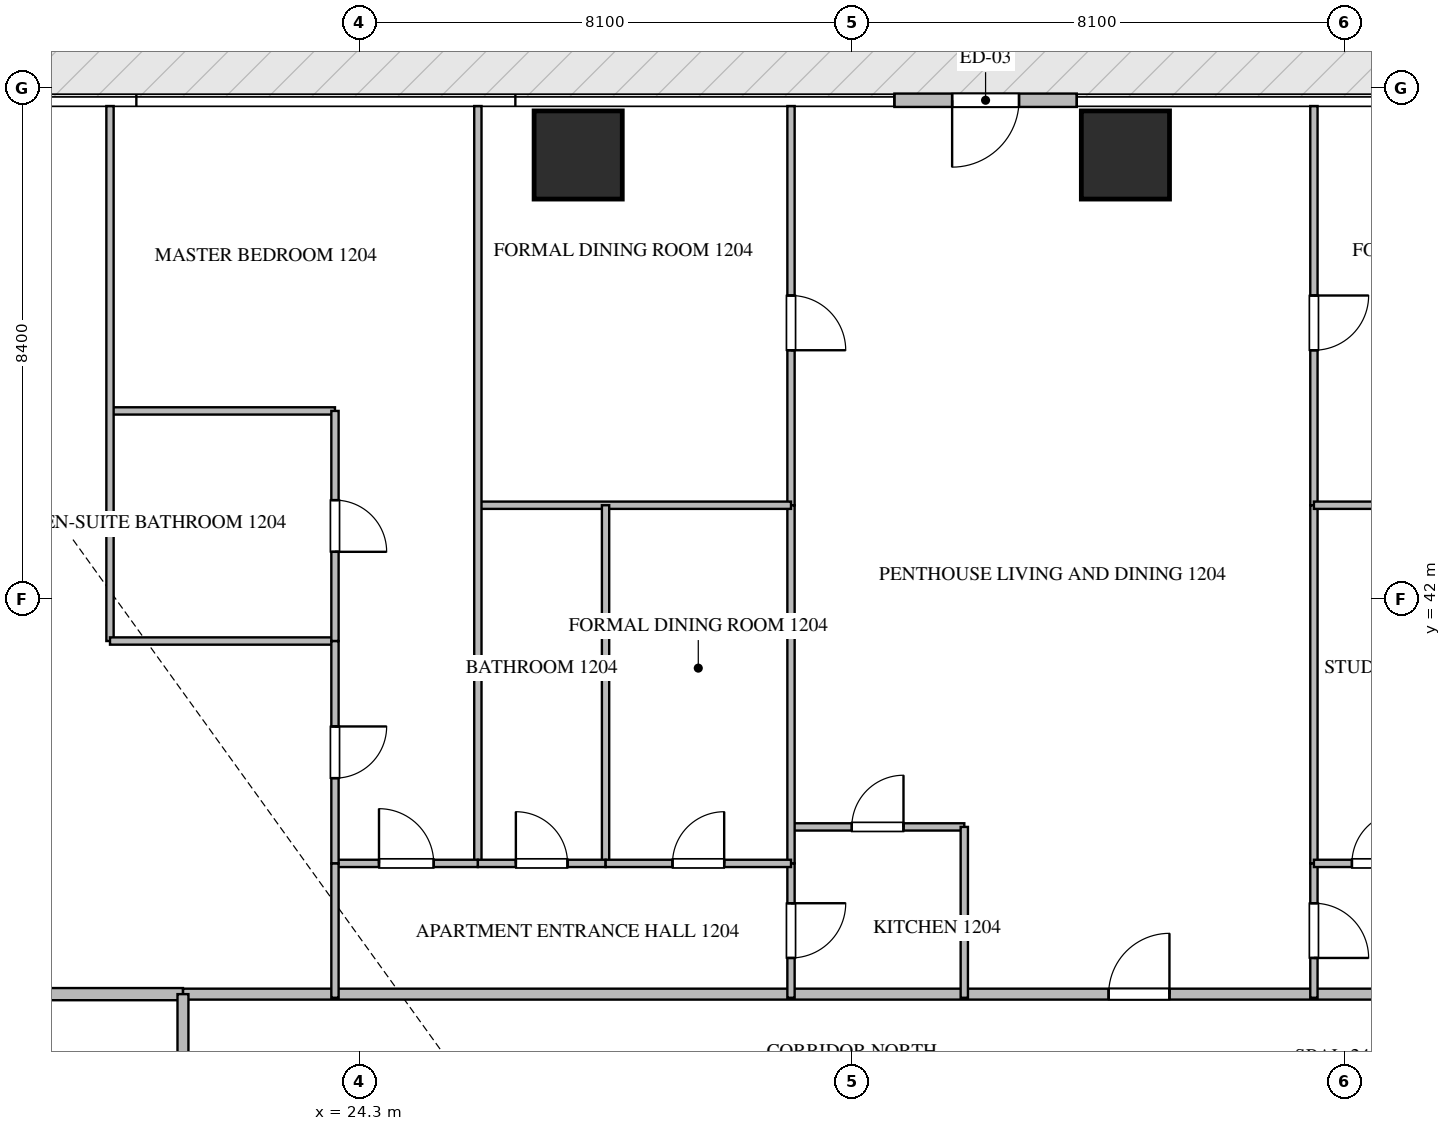
"""IFC4 building model, lengths in metres.
Left out: names, types, materials, properties, quantities, classifications, styles, units other than length and angle.
Written with IfcOpenShell. Run it as: python <this file> out.ifc"""

import sys

from ifc_helpers import new_model, si_unit, direction, frame, frame_2d, origin, origin_2d, place, context, subcontext, project, spatial, rectangle, extrude, source, transform, mapped, element, fill, save


model = new_model("IFC4")
c1 = context("Model", 3, precision=1e-05, world=origin(), true_north=direction((0.0, 1.0)))
c2 = subcontext(c1, "Body", "Model", "MODEL_VIEW")
j1 = project(units=[si_unit("LENGTHUNIT", "METRE"), si_unit("PLANEANGLEUNIT", "RADIAN")], contexts=[c1])
p1 = place(None, origin())
s1 = spatial("IfcSite", under=j1, at=p1, CompositionType="ELEMENT")
p2 = place(p1, origin())
s2 = spatial("IfcBuilding", under=s1, at=p2, CompositionType="ELEMENT")
p3 = place(p2, frame((0.0, 0.0, 52.95)))
s3 = spatial("IfcBuildingStorey", under=s2, at=p3, CompositionType="ELEMENT", Elevation=52.95)
m1 = source(origin(), c2, "Body", "SweptSolid", [
    extrude(rectangle(XDim=1.45, YDim=1.45, at=origin_2d()), origin(), (0.0, 0.0, 1.0), 3.75),
])
for number, where, z_axis, x_axis in (
    (1, (27.9, 49.3, -0.26), (0.0, 0.0, 1.0), (1.0, 0.0, 0.0)),
    (2, (36.9, 49.3, -0.26), (0.0, 0.0, 1.0), (1.0, 0.0, 0.0)),
):
    element("IfcColumn", number, at=place(p3, frame(where, z_axis=z_axis, x_axis=x_axis)), inside=s3, PredefinedType="COLUMN", context=c2, shape_type="MappedRepresentation", body=[
        mapped(m1, transform((0.0, 0.0, 0.0), scale=1.0)),
    ])
p4 = place(p3, frame((36.1, 50.2, 0.0), z_axis=(0.0, 0.0, 1.0), x_axis=(-1.0, 0.0, 0.0)))
e3 = element("IfcWall", 3, at=p4, inside=s3, PredefinedType="ELEMENTEDWALL", context=c2, shape_type="SweptSolid", body=[
    extrude(rectangle(XDim=3.0, YDim=0.22, at=frame_2d((1.5, 0.0))), origin(), (0.0, 0.0, 1.0), 3.475),
])
p5 = place(p4, frame((0.95, 0.0, 0.0)))
e4 = element("IfcOpeningElement", 4, at=p5, cuts=e3, PredefinedType="OPENING", context=c2, shape_type="SweptSolid", body=[
    extrude(rectangle(XDim=1.1, YDim=2.2, at=frame_2d((0.55, 1.1))), frame((0.0, 0.12, 0.0), z_axis=(0.0, -1.0, 0.0), x_axis=(1.0, 0.0, 0.0)), (0.0, 0.0, 1.0), 0.24),
])
p6 = place(p3, frame((6.082, 35.5, 0.0), z_axis=(0.0, 0.0, 1.0), x_axis=(1.0, 0.0, 0.0)))
e5 = element("IfcWall", 5, at=p6, inside=s3, PredefinedType="PARTITIONING", context=c2, shape_type="SweptSolid", body=[
    extrude(rectangle(XDim=15.318, YDim=0.2, at=frame_2d((7.659, 0.0))), origin(), (0.0, 0.0, 1.0), 3.49),
])
p7 = place(p3, frame((21.402, 35.5, 0.0), z_axis=(0.0, 0.0, 1.0), x_axis=(1.0, 0.0, 0.0)))
e6 = element("IfcWall", 6, at=p7, inside=s3, PredefinedType="PARTITIONING", context=c2, shape_type="SweptSolid", body=[
    extrude(rectangle(XDim=21.996, YDim=0.18, at=frame_2d((10.998, 0.0))), origin(), (0.0, 0.0, 1.0), 3.49),
])
p8 = place(p7, frame((15.222, 0.0, 0.0)))
e7 = element("IfcOpeningElement", 7, at=p8, cuts=e6, PredefinedType="OPENING", context=c2, shape_type="SweptSolid", body=[
    extrude(rectangle(XDim=1.0, YDim=2.15, at=frame_2d((0.5, 1.075))), frame((0.0, 0.1, 0.0), z_axis=(0.0, -1.0, 0.0), x_axis=(1.0, 0.0, 0.0)), (0.0, 0.0, 1.0), 0.2),
])
p9 = place(p3, frame((21.4, 14.9, 0.0), z_axis=(0.0, 0.0, 1.0), x_axis=(0.0, 1.0, 0.0)))
e8 = element("IfcWall", 8, at=p9, inside=s3, PredefinedType="PARTITIONING", context=c2, shape_type="SweptSolid", body=[
    extrude(rectangle(XDim=20.6, YDim=0.18, at=frame_2d((10.3, 0.0))), origin(), (0.0, 0.0, 1.0), 3.49),
])
p10 = place(p9, frame((1.96, 0.0, 0.0)))
e9 = element("IfcOpeningElement", 9, at=p10, cuts=e8, PredefinedType="OPENING", context=c2, shape_type="SweptSolid", body=[
    extrude(rectangle(XDim=1.0, YDim=2.15, at=frame_2d((0.5, 1.075))), frame((0.0, 0.1, 0.0), z_axis=(0.0, -1.0, 0.0), x_axis=(1.0, 0.0, 0.0)), (0.0, 0.0, 1.0), 0.2),
])
p11 = place(p3, frame((31.4, 38.25, 0.0), z_axis=(0.0, 0.0, 1.0), x_axis=(1.0, 0.0, 0.0)))
e10 = element("IfcWall", 10, at=p11, inside=s3, PredefinedType="PARTITIONING", context=c2, shape_type="SweptSolid", body=[
    extrude(rectangle(XDim=2.85, YDim=0.12, at=frame_2d((1.425, 0.0))), origin(), (0.0, 0.0, 1.0), 3.49),
])
p12 = place(p11, frame((1.0, 0.0, 0.0)))
e11 = element("IfcOpeningElement", 11, at=p12, cuts=e10, PredefinedType="OPENING", context=c2, shape_type="SweptSolid", body=[
    extrude(rectangle(XDim=0.85, YDim=2.1, at=frame_2d((0.425, 1.05))), frame((0.0, 0.07, 0.0), z_axis=(0.0, -1.0, 0.0), x_axis=(1.0, 0.0, 0.0)), (0.0, 0.0, 1.0), 0.14),
])
p13 = place(p3, frame((34.25, 38.25, 0.0), z_axis=(0.0, 0.0, 1.0), x_axis=(0.0, -1.0, 0.0)))
e12 = element("IfcWall", 12, at=p13, inside=s3, PredefinedType="PARTITIONING", context=c2, shape_type="SweptSolid", body=[
    extrude(rectangle(XDim=2.81, YDim=0.12, at=frame_2d((1.405, 0.0))), origin(), (0.0, 0.0, 1.0), 3.49),
])
p14 = place(p3, frame((31.4, 37.65, 0.0), z_axis=(0.0, 0.0, 1.0), x_axis=(0.0, -1.0, 0.0)))
e13 = element("IfcWall", 13, at=p14, inside=s3, PredefinedType="PARTITIONING", context=c2, shape_type="SweptSolid", body=[
    extrude(rectangle(XDim=2.21, YDim=0.12, at=frame_2d((1.105, 0.0))), origin(), (0.0, 0.0, 1.0), 3.49),
])
p15 = place(p14, frame((0.655, 0.0, 0.0)))
e14 = element("IfcOpeningElement", 14, at=p15, cuts=e13, PredefinedType="OPENING", context=c2, shape_type="SweptSolid", body=[
    extrude(rectangle(XDim=0.9, YDim=2.1, at=frame_2d((0.45, 1.05))), frame((0.0, 0.07, 0.0), z_axis=(0.0, -1.0, 0.0), x_axis=(1.0, 0.0, 0.0)), (0.0, 0.0, 1.0), 0.14),
])
p16 = place(p3, frame((31.4, 50.105, 0.0), z_axis=(0.0, 0.0, 1.0), x_axis=(0.0, -1.0, 0.0)))
e15 = element("IfcWall", 15, at=p16, inside=s3, PredefinedType="PARTITIONING", context=c2, shape_type="SweptSolid", body=[
    extrude(rectangle(XDim=6.565, YDim=0.12, at=frame_2d((3.282, 0.0))), origin(), (0.0, 0.0, 1.0), 3.49),
])
p17 = place(p16, frame((3.116, 0.0, 0.0)))
e16 = element("IfcOpeningElement", 16, at=p17, cuts=e15, PredefinedType="OPENING", context=c2, shape_type="SweptSolid", body=[
    extrude(rectangle(XDim=0.9, YDim=2.1, at=frame_2d((0.45, 1.05))), frame((0.0, 0.07, 0.0), z_axis=(0.0, -1.0, 0.0), x_axis=(1.0, 0.0, 0.0)), (0.0, 0.0, 1.0), 0.14),
])
p18 = place(p3, frame((31.4, 43.538, 0.0), z_axis=(0.0, 0.0, 1.0), x_axis=(0.0, -1.0, 0.0)))
e17 = element("IfcWall", 17, at=p18, inside=s3, PredefinedType="PARTITIONING", context=c2, shape_type="SweptSolid", body=[
    extrude(rectangle(XDim=5.886, YDim=0.12, at=frame_2d((2.943, 0.0))), origin(), (0.0, 0.0, 1.0), 3.49),
])
p19 = place(p3, frame((26.25, 43.54, 0.0), z_axis=(0.0, 0.0, 1.0), x_axis=(1.0, 0.0, 0.0)))
e18 = element("IfcWall", 18, at=p19, inside=s3, PredefinedType="PARTITIONING", context=c2, shape_type="SweptSolid", body=[
    extrude(rectangle(XDim=5.15, YDim=0.12, at=frame_2d((2.575, 0.0))), origin(), (0.0, 0.0, 1.0), 3.49),
])
p20 = place(p3, frame((26.25, 50.105, 0.0), z_axis=(0.0, 0.0, 1.0), x_axis=(0.0, -1.0, 0.0)))
e19 = element("IfcWall", 19, at=p20, inside=s3, PredefinedType="PARTITIONING", context=c2, shape_type="SweptSolid", body=[
    extrude(rectangle(XDim=12.455, YDim=0.12, at=frame_2d((6.228, 0.0))), origin(), (0.0, 0.0, 1.0), 3.49),
])
p21 = place(p3, frame((28.35, 43.54, 0.0), z_axis=(0.0, 0.0, 1.0), x_axis=(0.0, -1.0, 0.0)))
e20 = element("IfcWall", 20, at=p21, inside=s3, PredefinedType="PARTITIONING", context=c2, shape_type="SweptSolid", body=[
    extrude(rectangle(XDim=5.89, YDim=0.12, at=frame_2d((2.945, 0.0))), origin(), (0.0, 0.0, 1.0), 3.49),
])
p22 = place(p3, frame((26.25, 37.65, 0.0), z_axis=(0.0, 0.0, 1.0), x_axis=(1.0, 0.0, 0.0)))
e21 = element("IfcWall", 21, at=p22, inside=s3, PredefinedType="PARTITIONING", context=c2, shape_type="SweptSolid", body=[
    extrude(rectangle(XDim=2.1, YDim=0.12, at=frame_2d((1.05, 0.0))), origin(), (0.0, 0.0, 1.0), 3.49),
])
p23 = place(p22, frame((0.625, 0.0, 0.0)))
e22 = element("IfcOpeningElement", 22, at=p23, cuts=e21, PredefinedType="OPENING", context=c2, shape_type="SweptSolid", body=[
    extrude(rectangle(XDim=0.85, YDim=2.1, at=frame_2d((0.425, 1.05))), frame((0.0, 0.07, 0.0), z_axis=(0.0, -1.0, 0.0), x_axis=(1.0, 0.0, 0.0)), (0.0, 0.0, 1.0), 0.14),
])
p24 = place(p3, frame((28.352, 37.65, 0.0), z_axis=(0.0, 0.0, 1.0), x_axis=(1.0, 0.0, 0.0)))
e23 = element("IfcWall", 23, at=p24, inside=s3, PredefinedType="PARTITIONING", context=c2, shape_type="SweptSolid", body=[
    extrude(rectangle(XDim=3.048, YDim=0.12, at=frame_2d((1.524, 0.0))), origin(), (0.0, 0.0, 1.0), 3.49),
])
p25 = place(p24, frame((1.099, 0.0, 0.0)))
e24 = element("IfcOpeningElement", 24, at=p25, cuts=e23, PredefinedType="OPENING", context=c2, shape_type="SweptSolid", body=[
    extrude(rectangle(XDim=0.85, YDim=2.1, at=frame_2d((0.425, 1.05))), frame((0.0, 0.07, 0.0), z_axis=(0.0, -1.0, 0.0), x_axis=(1.0, 0.0, 0.0)), (0.0, 0.0, 1.0), 0.14),
])
p26 = place(p3, frame((23.9, 37.65, 0.0), z_axis=(0.0, 0.0, 1.0), x_axis=(1.0, 0.0, 0.0)))
e25 = element("IfcWall", 25, at=p26, inside=s3, PredefinedType="PARTITIONING", context=c2, shape_type="SweptSolid", body=[
    extrude(rectangle(XDim=2.348, YDim=0.12, at=frame_2d((1.174, 0.0))), origin(), (0.0, 0.0, 1.0), 3.49),
])
p27 = place(p26, frame((0.724, 0.0, 0.0)))
e26 = element("IfcOpeningElement", 26, at=p27, cuts=e25, PredefinedType="OPENING", context=c2, shape_type="SweptSolid", body=[
    extrude(rectangle(XDim=0.9, YDim=2.1, at=frame_2d((0.45, 1.05))), frame((0.0, 0.07, 0.0), z_axis=(0.0, -1.0, 0.0), x_axis=(1.0, 0.0, 0.0)), (0.0, 0.0, 1.0), 0.14),
])
p28 = place(p3, frame((20.2, 45.091, 0.0), z_axis=(0.0, 0.0, 1.0), x_axis=(1.0, 0.0, 0.0)))
e27 = element("IfcWall", 27, at=p28, inside=s3, PredefinedType="PARTITIONING", context=c2, shape_type="SweptSolid", body=[
    extrude(rectangle(XDim=3.7, YDim=0.12, at=frame_2d((1.85, 0.0))), origin(), (0.0, 0.0, 1.0), 3.49),
])
p29 = place(p3, frame((20.2, 50.105, 0.0), z_axis=(0.0, 0.0, 1.0), x_axis=(0.0, -1.0, 0.0)))
e28 = element("IfcWall", 28, at=p29, inside=s3, PredefinedType="PARTITIONING", context=c2, shape_type="SweptSolid", body=[
    extrude(rectangle(XDim=8.798, YDim=0.12, at=frame_2d((4.399, 0.0))), origin(), (0.0, 0.0, 1.0), 3.49),
])
p30 = place(p3, frame((20.2, 41.307, 0.0), z_axis=(0.0, 0.0, 1.0), x_axis=(1.0, 0.0, 0.0)))
e29 = element("IfcWall", 29, at=p30, inside=s3, PredefinedType="PARTITIONING", context=c2, shape_type="SweptSolid", body=[
    extrude(rectangle(XDim=3.7, YDim=0.12, at=frame_2d((1.85, 0.0))), origin(), (0.0, 0.0, 1.0), 3.49),
])
p31 = place(p3, frame((23.9, 45.091, 0.0), z_axis=(0.0, 0.0, 1.0), x_axis=(0.0, -1.0, 0.0)))
e30 = element("IfcWall", 30, at=p31, inside=s3, PredefinedType="PARTITIONING", context=c2, shape_type="SweptSolid", body=[
    extrude(rectangle(XDim=3.784, YDim=0.12, at=frame_2d((1.892, 0.0))), origin(), (0.0, 0.0, 1.0), 3.49),
])
p32 = place(p31, frame((1.467, 0.0, 0.0)))
e31 = element("IfcOpeningElement", 31, at=p32, cuts=e30, PredefinedType="OPENING", context=c2, shape_type="SweptSolid", body=[
    extrude(rectangle(XDim=0.85, YDim=2.1, at=frame_2d((0.425, 1.05))), frame((0.0, 0.07, 0.0), z_axis=(0.0, -1.0, 0.0), x_axis=(1.0, 0.0, 0.0)), (0.0, 0.0, 1.0), 0.14),
])
p33 = place(p3, frame((23.9, 41.305, 0.0), z_axis=(0.0, 0.0, 1.0), x_axis=(0.0, -1.0, 0.0)))
e32 = element("IfcWall", 32, at=p33, inside=s3, PredefinedType="PARTITIONING", context=c2, shape_type="SweptSolid", body=[
    extrude(rectangle(XDim=3.655, YDim=0.12, at=frame_2d((1.828, 0.0))), origin(), (0.0, 0.0, 1.0), 3.49),
])
p34 = place(p33, frame((1.403, 0.0, 0.0)))
e33 = element("IfcOpeningElement", 33, at=p34, cuts=e32, PredefinedType="OPENING", context=c2, shape_type="SweptSolid", body=[
    extrude(rectangle(XDim=0.85, YDim=2.1, at=frame_2d((0.425, 1.05))), frame((0.0, 0.07, 0.0), z_axis=(0.0, -1.0, 0.0), x_axis=(1.0, 0.0, 0.0)), (0.0, 0.0, 1.0), 0.14),
])
p35 = place(p3, frame((23.9, 37.648, 0.0), z_axis=(0.0, 0.0, 1.0), x_axis=(0.0, -1.0, 0.0)))
e34 = element("IfcWall", 34, at=p35, inside=s3, PredefinedType="PARTITIONING", context=c2, shape_type="SweptSolid", body=[
    extrude(rectangle(XDim=2.208, YDim=0.12, at=frame_2d((1.104, 0.0))), origin(), (0.0, 0.0, 1.0), 3.49),
])
p36 = place(p3, frame((40.0, 37.65, 0.0), z_axis=(0.0, 0.0, 1.0), x_axis=(0.0, -1.0, 0.0)))
e35 = element("IfcWall", 35, at=p36, inside=s3, PredefinedType="PARTITIONING", context=c2, shape_type="SweptSolid", body=[
    extrude(rectangle(XDim=2.21, YDim=0.12, at=frame_2d((1.105, 0.0))), origin(), (0.0, 0.0, 1.0), 3.49),
])
p37 = place(p36, frame((0.655, 0.0, 0.0)))
e36 = element("IfcOpeningElement", 36, at=p37, cuts=e35, PredefinedType="OPENING", context=c2, shape_type="SweptSolid", body=[
    extrude(rectangle(XDim=0.9, YDim=2.1, at=frame_2d((0.45, 1.05))), frame((0.0, 0.07, 0.0), z_axis=(0.0, -1.0, 0.0), x_axis=(1.0, 0.0, 0.0)), (0.0, 0.0, 1.0), 0.14),
])
p38 = place(p3, frame((40.0, 50.105, 0.0), z_axis=(0.0, 0.0, 1.0), x_axis=(0.0, -1.0, 0.0)))
e37 = element("IfcWall", 37, at=p38, inside=s3, PredefinedType="PARTITIONING", context=c2, shape_type="SweptSolid", body=[
    extrude(rectangle(XDim=6.565, YDim=0.12, at=frame_2d((3.282, 0.0))), origin(), (0.0, 0.0, 1.0), 3.49),
])
p39 = place(p38, frame((3.116, 0.0, 0.0)))
e38 = element("IfcOpeningElement", 38, at=p39, cuts=e37, PredefinedType="OPENING", context=c2, shape_type="SweptSolid", body=[
    extrude(rectangle(XDim=0.9, YDim=2.1, at=frame_2d((0.45, 1.05))), frame((0.0, 0.07, 0.0), z_axis=(0.0, -1.0, 0.0), x_axis=(1.0, 0.0, 0.0)), (0.0, 0.0, 1.0), 0.14),
])
p40 = place(p3, frame((40.0, 43.538, 0.0), z_axis=(0.0, 0.0, 1.0), x_axis=(0.0, -1.0, 0.0)))
e39 = element("IfcWall", 39, at=p40, inside=s3, PredefinedType="PARTITIONING", context=c2, shape_type="SweptSolid", body=[
    extrude(rectangle(XDim=5.886, YDim=0.12, at=frame_2d((2.943, 0.0))), origin(), (0.0, 0.0, 1.0), 3.49),
])
p41 = place(p3, frame((40.0, 43.54, 0.0), z_axis=(0.0, 0.0, 1.0), x_axis=(1.0, 0.0, 0.0)))
e40 = element("IfcWall", 40, at=p41, inside=s3, PredefinedType="PARTITIONING", context=c2, shape_type="SweptSolid", body=[
    extrude(rectangle(XDim=5.15, YDim=0.12, at=frame_2d((2.575, 0.0))), origin(), (0.0, 0.0, 1.0), 3.49),
])
p42 = place(p3, frame((40.0, 37.65, 0.0), z_axis=(0.0, 0.0, 1.0), x_axis=(1.0, 0.0, 0.0)))
e41 = element("IfcWall", 41, at=p42, inside=s3, PredefinedType="PARTITIONING", context=c2, shape_type="SweptSolid", body=[
    extrude(rectangle(XDim=2.1, YDim=0.12, at=frame_2d((1.05, 0.0))), origin(), (0.0, 0.0, 1.0), 3.49),
])
p43 = place(p42, frame((0.625, 0.0, 0.0)))
e42 = element("IfcOpeningElement", 42, at=p43, cuts=e41, PredefinedType="OPENING", context=c2, shape_type="SweptSolid", body=[
    extrude(rectangle(XDim=0.85, YDim=2.1, at=frame_2d((0.425, 1.05))), frame((0.0, 0.07, 0.0), z_axis=(0.0, -1.0, 0.0), x_axis=(1.0, 0.0, 0.0)), (0.0, 0.0, 1.0), 0.14),
])
m2 = source(origin(), c2, "Body", "SweptSolid", [
    extrude(rectangle(XDim=1.1, YDim=2.2, at=frame_2d((0.55, 1.1))), frame((0.0, 0.025, 0.0), z_axis=(0.0, -1.0, 0.0), x_axis=(1.0, 0.0, 0.0)), (0.0, 0.0, 1.0), 0.05),
])
p44 = place(p5, origin())
e43 = element("IfcDoor", 43, at=p44, inside=s3, OperationType="SINGLE_SWING_RIGHT", PredefinedType="DOOR", context=c2, shape_type="MappedRepresentation", body=[
    mapped(m2, transform((0.0, 0.0, 0.0), scale=1.0)),
])
fill(e4, e43)
m3 = source(origin(), c2, "Body", "SweptSolid", [
    extrude(rectangle(XDim=1.0, YDim=2.15, at=frame_2d((0.5, 1.075))), frame((0.0, 0.025, 0.0), z_axis=(0.0, -1.0, 0.0), x_axis=(1.0, 0.0, 0.0)), (0.0, 0.0, 1.0), 0.05),
])
p45 = place(p8, origin())
e44 = element("IfcDoor", 44, at=p45, inside=s3, OperationType="SINGLE_SWING_RIGHT", PredefinedType="DOOR", context=c2, shape_type="MappedRepresentation", body=[
    mapped(m3, transform((0.0, 0.0, 0.0), scale=1.0)),
])
fill(e7, e44)
m4 = source(origin(), c2, "Body", "SweptSolid", [
    extrude(rectangle(XDim=0.85, YDim=2.1, at=frame_2d((0.425, 1.05))), frame((0.0, 0.025, 0.0), z_axis=(0.0, -1.0, 0.0), x_axis=(1.0, 0.0, 0.0)), (0.0, 0.0, 1.0), 0.05),
])
p46 = place(p12, origin())
e45 = element("IfcDoor", 45, at=p46, inside=s3, OperationType="SINGLE_SWING_RIGHT", PredefinedType="DOOR", context=c2, shape_type="MappedRepresentation", body=[
    mapped(m4, transform((0.0, 0.0, 0.0), scale=1.0)),
])
fill(e11, e45)
m5 = source(origin(), c2, "Body", "SweptSolid", [
    extrude(rectangle(XDim=0.9, YDim=2.1, at=frame_2d((0.45, 1.05))), frame((0.0, 0.025, 0.0), z_axis=(0.0, -1.0, 0.0), x_axis=(1.0, 0.0, 0.0)), (0.0, 0.0, 1.0), 0.05),
])
p47 = place(p15, origin())
e46 = element("IfcDoor", 46, at=p47, inside=s3, OperationType="SINGLE_SWING_LEFT", PredefinedType="DOOR", context=c2, shape_type="MappedRepresentation", body=[
    mapped(m5, transform((0.0, 0.0, 0.0), scale=1.0)),
])
fill(e14, e46)
p48 = place(p17, origin())
e47 = element("IfcDoor", 47, at=p48, inside=s3, OperationType="SINGLE_SWING_RIGHT", PredefinedType="DOOR", context=c2, shape_type="MappedRepresentation", body=[
    mapped(m5, transform((0.0, 0.0, 0.0), scale=1.0)),
])
fill(e16, e47)
p49 = place(p23, origin())
e48 = element("IfcDoor", 48, at=p49, inside=s3, OperationType="SINGLE_SWING_LEFT", PredefinedType="DOOR", context=c2, shape_type="MappedRepresentation", body=[
    mapped(m4, transform((0.0, 0.0, 0.0), scale=1.0)),
])
fill(e22, e48)
p50 = place(p25, origin())
e49 = element("IfcDoor", 49, at=p50, inside=s3, OperationType="SINGLE_SWING_RIGHT", PredefinedType="DOOR", context=c2, shape_type="MappedRepresentation", body=[
    mapped(m4, transform((0.0, 0.0, 0.0), scale=1.0)),
])
fill(e24, e49)
p51 = place(p27, origin())
e50 = element("IfcDoor", 50, at=p51, inside=s3, OperationType="SINGLE_SWING_LEFT", PredefinedType="DOOR", context=c2, shape_type="MappedRepresentation", body=[
    mapped(m5, transform((0.0, 0.0, 0.0), scale=1.0)),
])
fill(e26, e50)
p52 = place(p32, origin())
e51 = element("IfcDoor", 51, at=p52, inside=s3, OperationType="SINGLE_SWING_RIGHT", PredefinedType="DOOR", context=c2, shape_type="MappedRepresentation", body=[
    mapped(m4, transform((0.0, 0.0, 0.0), scale=1.0)),
])
fill(e31, e51)
p53 = place(p34, origin())
e52 = element("IfcDoor", 52, at=p53, inside=s3, OperationType="SINGLE_SWING_LEFT", PredefinedType="DOOR", context=c2, shape_type="MappedRepresentation", body=[
    mapped(m4, transform((0.0, 0.0, 0.0), scale=1.0)),
])
fill(e33, e52)
p54 = place(p37, origin())
e53 = element("IfcDoor", 53, at=p54, inside=s3, OperationType="SINGLE_SWING_RIGHT", PredefinedType="DOOR", context=c2, shape_type="MappedRepresentation", body=[
    mapped(m5, transform((0.0, 0.0, 0.0), scale=1.0)),
])
fill(e36, e53)
p55 = place(p39, origin())
e54 = element("IfcDoor", 54, at=p55, inside=s3, OperationType="SINGLE_SWING_LEFT", PredefinedType="DOOR", context=c2, shape_type="MappedRepresentation", body=[
    mapped(m5, transform((0.0, 0.0, 0.0), scale=1.0)),
])
fill(e38, e54)
p56 = place(p43, origin())
e55 = element("IfcDoor", 55, at=p56, inside=s3, OperationType="SINGLE_SWING_RIGHT", PredefinedType="DOOR", context=c2, shape_type="MappedRepresentation", body=[
    mapped(m4, transform((0.0, 0.0, 0.0), scale=1.0)),
])
fill(e42, e55)
save(model, sys.argv[1])
